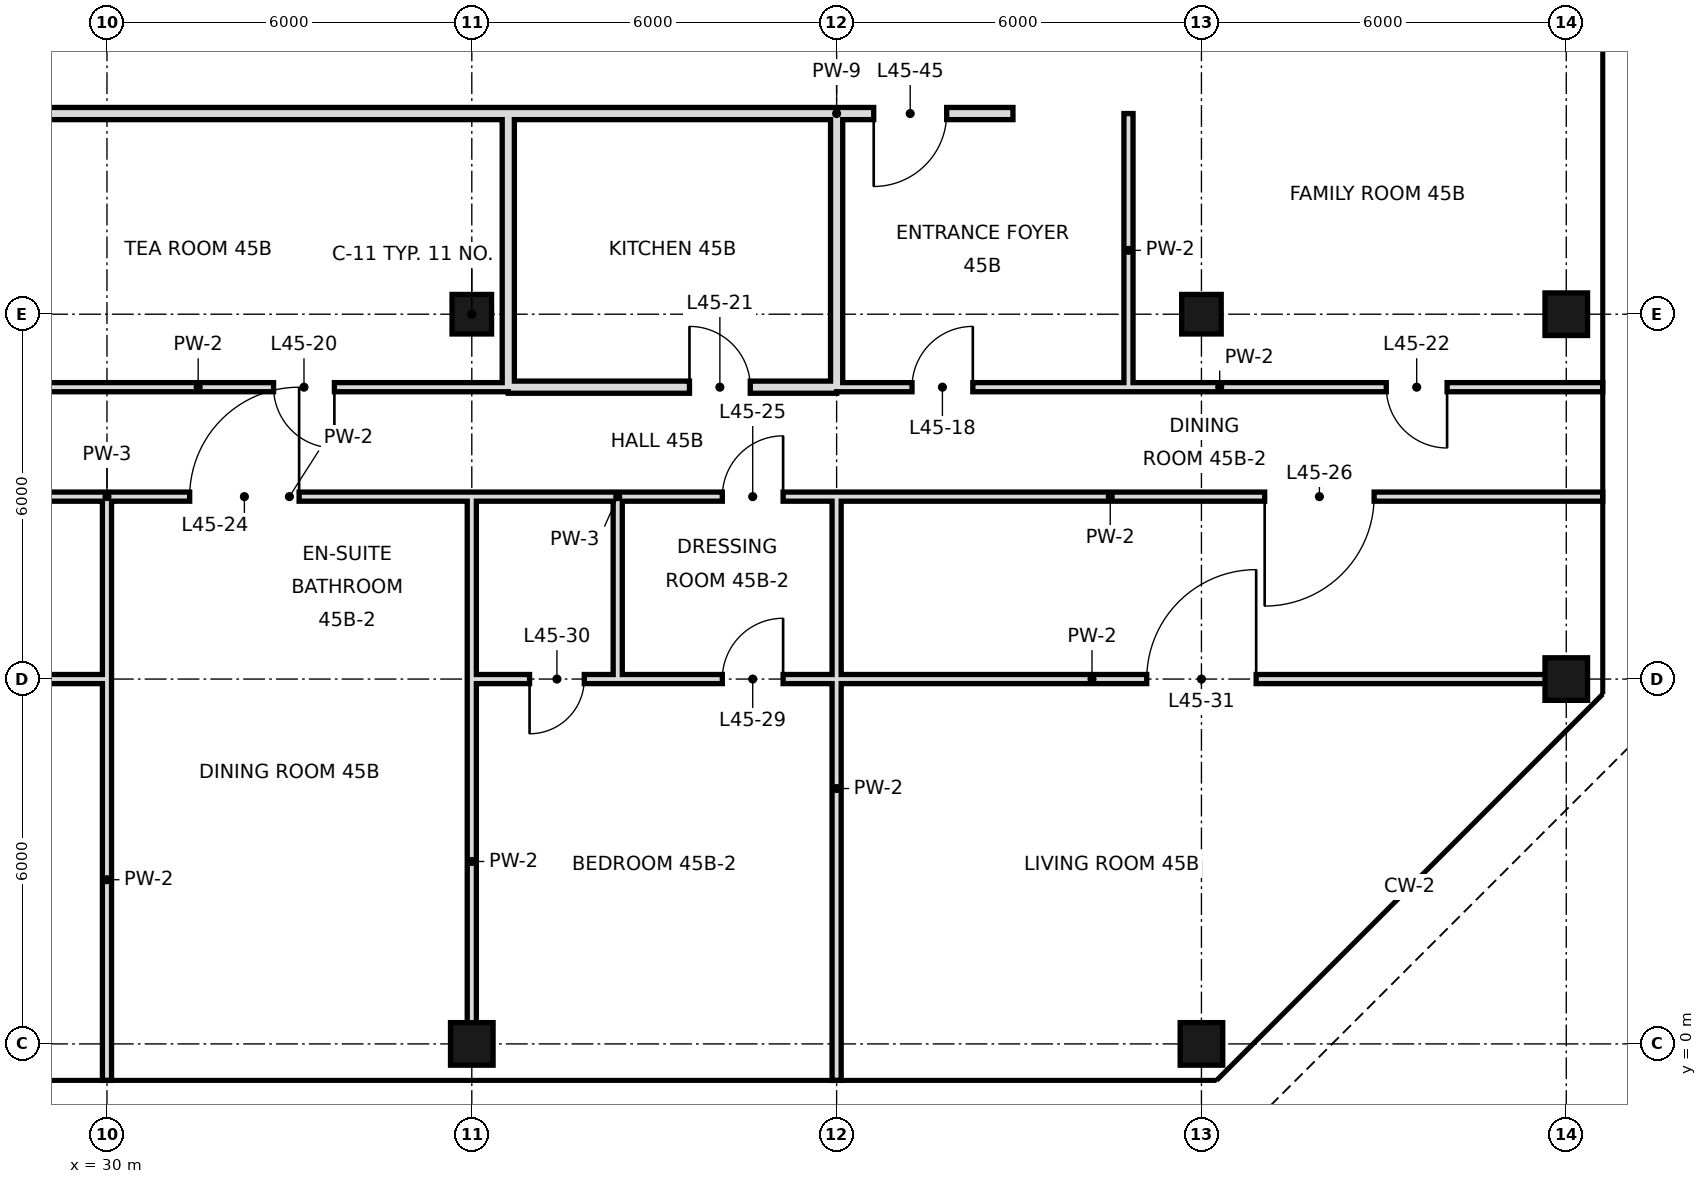
"""IFC4 building model, lengths in metres.
Left out: names, types, materials, properties, quantities, classifications, styles, units other than length and angle.
Written with IfcOpenShell. Run it as: python <this file> out.ifc"""

import sys

from ifc_helpers import new_model, si_unit, direction, frame, frame_2d, origin, origin_2d, place, context, subcontext, project, spatial, rectangle, hollow_rectangle, extrude, element, fill, save


model = new_model("IFC4")
c1 = context("Model", 3, precision=1e-05, world=origin(), true_north=direction((0.0, 1.0)))
c2 = subcontext(c1, "Body", "Model", "MODEL_VIEW")
j1 = project(units=[si_unit("LENGTHUNIT", "METRE"), si_unit("PLANEANGLEUNIT", "RADIAN")], contexts=[c1])
p1 = place(None, origin())
s1 = spatial("IfcSite", under=j1, at=p1, CompositionType="ELEMENT")
p2 = place(p1, origin())
s2 = spatial("IfcBuilding", under=s1, at=p2, CompositionType="ELEMENT")
p3 = place(p2, frame((0.0, 0.0, 195.6)))
s3 = spatial("IfcBuildingStorey", under=s2, at=p3, CompositionType="ELEMENT", Elevation=195.6)
p4 = place(p3, frame((36.0, 0.0, 0.0), z_axis=(0.0, 0.0, 1.0), x_axis=(1.0, 0.0, 0.0)))
e1 = element("IfcColumn", 1, at=p4, inside=s3, PredefinedType="COLUMN", context=c2, shape_type="SweptSolid", body=[
    extrude(hollow_rectangle(XDim=0.7, YDim=0.7, WallThickness=0.036, at=origin_2d()), origin(), (0.0, 0.0, 1.0), 3.6),
])
p5 = place(p3, frame((36.0, 12.0, 0.0), z_axis=(0.0, 0.0, 1.0), x_axis=(1.0, 0.0, 0.0)))
e2 = element("IfcColumn", 2, at=p5, inside=s3, PredefinedType="COLUMN", context=c2, shape_type="SweptSolid", body=[
    extrude(hollow_rectangle(XDim=0.65, YDim=0.65, WallThickness=0.032, at=origin_2d()), origin(), (0.0, 0.0, 1.0), 3.6),
])
p6 = place(p3, frame((48.0, 0.0, 0.0), z_axis=(0.0, 0.0, 1.0), x_axis=(1.0, 0.0, 0.0)))
e3 = element("IfcColumn", 3, at=p6, inside=s3, PredefinedType="COLUMN", context=c2, shape_type="SweptSolid", body=[
    extrude(hollow_rectangle(XDim=0.7, YDim=0.7, WallThickness=0.036, at=origin_2d()), origin(), (0.0, 0.0, 1.0), 3.6),
])
p7 = place(p3, frame((48.0, 12.0, 0.0), z_axis=(0.0, 0.0, 1.0), x_axis=(1.0, 0.0, 0.0)))
e4 = element("IfcColumn", 4, at=p7, inside=s3, PredefinedType="COLUMN", context=c2, shape_type="SweptSolid", body=[
    extrude(hollow_rectangle(XDim=0.65, YDim=0.65, WallThickness=0.032, at=origin_2d()), origin(), (0.0, 0.0, 1.0), 3.6),
])
for number, where, z_axis, x_axis in (
    (5, (54.0, 6.0, 0.0), (0.0, 0.0, 1.0), (1.0, 0.0, 0.0)),
    (6, (54.0, 12.0, 0.0), (0.0, 0.0, 1.0), (1.0, 0.0, 0.0)),
):
    element("IfcColumn", number, at=place(p3, frame(where, z_axis=z_axis, x_axis=x_axis)), inside=s3, PredefinedType="COLUMN", context=c2, shape_type="SweptSolid", body=[
        extrude(hollow_rectangle(XDim=0.7, YDim=0.7, WallThickness=0.036, at=origin_2d()), origin(), (0.0, 0.0, 1.0), 3.6),
    ])
p8 = place(p3, frame((30.0, -0.6, 0.0), z_axis=(0.0, 0.0, 1.0), x_axis=(0.0, 1.0, 0.0)))
e7 = element("IfcWall", 7, at=p8, inside=s3, PredefinedType="PARTITIONING", context=c2, shape_type="SweptSolid", body=[
    extrude(rectangle(XDim=6.6, YDim=0.15, at=frame_2d((3.3, 0.0))), origin(), (0.0, 0.0, 1.0), 2.72),
])
p9 = place(p3, frame((30.0, 6.0, 0.0), z_axis=(0.0, 0.0, 1.0), x_axis=(0.0, 1.0, 0.0)))
e8 = element("IfcWall", 8, at=p9, inside=s3, PredefinedType="PARTITIONING", context=c2, shape_type="SweptSolid", body=[
    extrude(rectangle(XDim=3.0, YDim=0.15, at=frame_2d((1.5, 0.0))), origin(), (0.0, 0.0, 1.0), 2.72),
])
p10 = place(p3, frame((36.0, 0.0, 0.0), z_axis=(0.0, 0.0, 1.0), x_axis=(0.0, 1.0, 0.0)))
e9 = element("IfcWall", 9, at=p10, inside=s3, PredefinedType="PARTITIONING", context=c2, shape_type="SweptSolid", body=[
    extrude(rectangle(XDim=6.0, YDim=0.15, at=frame_2d((3.0, 0.0))), origin(), (0.0, 0.0, 1.0), 2.72),
])
p11 = place(p3, frame((36.0, 6.0, 0.0), z_axis=(0.0, 0.0, 1.0), x_axis=(0.0, 1.0, 0.0)))
e10 = element("IfcWall", 10, at=p11, inside=s3, PredefinedType="PARTITIONING", context=c2, shape_type="SweptSolid", body=[
    extrude(rectangle(XDim=3.0, YDim=0.15, at=frame_2d((1.5, 0.0))), origin(), (0.0, 0.0, 1.0), 2.72),
])
p12 = place(p3, frame((36.6, 10.8, 0.0), z_axis=(0.0, 0.0, 1.0), x_axis=(0.0, 1.0, 0.0)))
e11 = element("IfcWall", 11, at=p12, inside=s3, PredefinedType="SOLIDWALL", context=c2, shape_type="SweptSolid", body=[
    extrude(rectangle(XDim=4.5, YDim=0.2, at=frame_2d((2.25, 0.0))), origin(), (0.0, 0.0, 1.0), 2.72),
])
p13 = place(p3, frame((38.4, 6.0, 0.0), z_axis=(0.0, 0.0, 1.0), x_axis=(0.0, 1.0, 0.0)))
e12 = element("IfcWall", 12, at=p13, inside=s3, PredefinedType="PARTITIONING", context=c2, shape_type="SweptSolid", body=[
    extrude(rectangle(XDim=3.0, YDim=0.15, at=frame_2d((1.5, 0.0))), origin(), (0.0, 0.0, 1.0), 3.42),
])
p14 = place(p3, frame((42.0, 10.8, 0.0), z_axis=(0.0, 0.0, 1.0), x_axis=(0.0, 1.0, 0.0)))
e13 = element("IfcWall", 13, at=p14, inside=s3, PredefinedType="SOLIDWALL", context=c2, shape_type="SweptSolid", body=[
    extrude(rectangle(XDim=4.5, YDim=0.2, at=frame_2d((2.25, 0.0))), origin(), (0.0, 0.0, 1.0), 2.72),
])
p15 = place(p3, frame((42.0, -0.6, 0.0), z_axis=(0.0, 0.0, 1.0), x_axis=(0.0, 1.0, 0.0)))
e14 = element("IfcWall", 14, at=p15, inside=s3, PredefinedType="PARTITIONING", context=c2, shape_type="SweptSolid", body=[
    extrude(rectangle(XDim=9.6, YDim=0.15, at=frame_2d((4.8, 0.0))), origin(), (0.0, 0.0, 1.0), 2.72),
])
p16 = place(p3, frame((46.8, 10.8, 0.0), z_axis=(0.0, 0.0, 1.0), x_axis=(0.0, 1.0, 0.0)))
e15 = element("IfcWall", 15, at=p16, inside=s3, PredefinedType="PARTITIONING", context=c2, shape_type="SweptSolid", body=[
    extrude(rectangle(XDim=4.5, YDim=0.15, at=frame_2d((2.25, 0.0))), origin(), (0.0, 0.0, 1.0), 3.42),
])
p17 = place(p3, frame((36.6, 10.8, 0.0), z_axis=(0.0, 0.0, 1.0), x_axis=(1.0, 0.0, 0.0)))
e16 = element("IfcWall", 16, at=p17, inside=s3, PredefinedType="SOLIDWALL", context=c2, shape_type="SweptSolid", body=[
    extrude(rectangle(XDim=5.4, YDim=0.2, at=frame_2d((2.7, 0.0))), origin(), (0.0, 0.0, 1.0), 2.72),
])
p18 = place(p17, frame((2.98, 0.0, 0.0)))
e17 = element("IfcOpeningElement", 17, at=p18, cuts=e16, PredefinedType="OPENING", context=c2, shape_type="SweptSolid", body=[
    extrude(rectangle(XDim=1.0, YDim=2.4, at=frame_2d((0.5, 1.2))), frame((0.0, 0.11, 0.0), z_axis=(0.0, -1.0, 0.0), x_axis=(1.0, 0.0, 0.0)), (0.0, 0.0, 1.0), 0.22),
])
p19 = place(p3, frame((26.4, 10.8, 0.0), z_axis=(0.0, 0.0, 1.0), x_axis=(1.0, 0.0, 0.0)))
e18 = element("IfcWall", 18, at=p19, inside=s3, PredefinedType="PARTITIONING", context=c2, shape_type="SweptSolid", body=[
    extrude(rectangle(XDim=10.2, YDim=0.15, at=frame_2d((5.1, 0.0))), origin(), (0.0, 0.0, 1.0), 3.42),
])
p20 = place(p19, frame((6.34, 0.0, 0.0)))
e19 = element("IfcOpeningElement", 19, at=p20, cuts=e18, PredefinedType="OPENING", context=c2, shape_type="SweptSolid", body=[
    extrude(rectangle(XDim=1.0, YDim=2.4, at=frame_2d((0.5, 1.2))), frame((0.0, 0.085, 0.0), z_axis=(0.0, -1.0, 0.0), x_axis=(1.0, 0.0, 0.0)), (0.0, 0.0, 1.0), 0.17),
])
p21 = place(p3, frame((42.0, 10.8, 0.0), z_axis=(0.0, 0.0, 1.0), x_axis=(1.0, 0.0, 0.0)))
e20 = element("IfcWall", 20, at=p21, inside=s3, PredefinedType="PARTITIONING", context=c2, shape_type="SweptSolid", body=[
    extrude(rectangle(XDim=12.6, YDim=0.15, at=frame_2d((6.3, 0.0))), origin(), (0.0, 0.0, 1.0), 3.42),
])
p22 = place(p21, frame((1.24, 0.0, 0.0)))
e21 = element("IfcOpeningElement", 21, at=p22, cuts=e20, PredefinedType="OPENING", context=c2, shape_type="SweptSolid", body=[
    extrude(rectangle(XDim=1.0, YDim=2.4, at=frame_2d((0.5, 1.2))), frame((0.0, 0.085, 0.0), z_axis=(0.0, -1.0, 0.0), x_axis=(1.0, 0.0, 0.0)), (0.0, 0.0, 1.0), 0.17),
])
p23 = place(p21, frame((9.04, 0.0, 0.0)))
e22 = element("IfcOpeningElement", 22, at=p23, cuts=e20, PredefinedType="OPENING", context=c2, shape_type="SweptSolid", body=[
    extrude(rectangle(XDim=1.0, YDim=2.4, at=frame_2d((0.5, 1.2))), frame((0.0, 0.085, 0.0), z_axis=(0.0, -1.0, 0.0), x_axis=(1.0, 0.0, 0.0)), (0.0, 0.0, 1.0), 0.17),
])
p24 = place(p3, frame((7.8, 15.3, 0.0), z_axis=(0.0, 0.0, 1.0), x_axis=(1.0, 0.0, 0.0)))
e23 = element("IfcWall", 23, at=p24, inside=s3, PredefinedType="SOLIDWALL", context=c2, shape_type="SweptSolid", body=[
    extrude(rectangle(XDim=28.8, YDim=0.2, at=frame_2d((14.4, 0.0))), origin(), (0.0, 0.0, 1.0), 2.72),
])
p25 = place(p24, frame((1.54, 0.0, 0.0)))
e24 = element("IfcOpeningElement", 24, at=p25, cuts=e23, PredefinedType="OPENING", context=c2, shape_type="SweptSolid", body=[
    extrude(rectangle(XDim=1.2, YDim=2.4, at=frame_2d((0.6, 1.2))), frame((0.0, 0.11, 0.0), z_axis=(0.0, -1.0, 0.0), x_axis=(1.0, 0.0, 0.0)), (0.0, 0.0, 1.0), 0.22),
])
p26 = place(p3, frame((42.0, 15.3, 0.0), z_axis=(0.0, 0.0, 1.0), x_axis=(1.0, 0.0, 0.0)))
e25 = element("IfcWall", 25, at=p26, inside=s3, PredefinedType="SOLIDWALL", context=c2, shape_type="SweptSolid", body=[
    extrude(rectangle(XDim=2.9, YDim=0.2, at=frame_2d((1.45, 0.0))), origin(), (0.0, 0.0, 1.0), 2.72),
])
p27 = place(p26, frame((0.61, 0.0, 0.0)))
e26 = element("IfcOpeningElement", 26, at=p27, cuts=e25, PredefinedType="OPENING", context=c2, shape_type="SweptSolid", body=[
    extrude(rectangle(XDim=1.2, YDim=2.4, at=frame_2d((0.6, 1.2))), frame((0.0, 0.11, 0.0), z_axis=(0.0, -1.0, 0.0), x_axis=(1.0, 0.0, 0.0)), (0.0, 0.0, 1.0), 0.22),
])
p28 = place(p3, frame((36.6, 15.3, 0.0), z_axis=(0.0, 0.0, 1.0), x_axis=(1.0, 0.0, 0.0)))
e27 = element("IfcWall", 27, at=p28, inside=s3, PredefinedType="SOLIDWALL", context=c2, shape_type="SweptSolid", body=[
    extrude(rectangle(XDim=5.4, YDim=0.2, at=frame_2d((2.7, 0.0))), origin(), (0.0, 0.0, 1.0), 2.72),
])
p29 = place(p3, frame((38.4, 6.0, 0.0), z_axis=(0.0, 0.0, 1.0), x_axis=(1.0, 0.0, 0.0)))
e28 = element("IfcWall", 28, at=p29, inside=s3, PredefinedType="PARTITIONING", context=c2, shape_type="SweptSolid", body=[
    extrude(rectangle(XDim=15.6, YDim=0.15, at=frame_2d((7.8, 0.0))), origin(), (0.0, 0.0, 1.0), 2.97),
])
p30 = place(p29, frame((1.72, 0.0, 0.0)))
e29 = element("IfcOpeningElement", 29, at=p30, cuts=e28, PredefinedType="OPENING", context=c2, shape_type="SweptSolid", body=[
    extrude(rectangle(XDim=1.0, YDim=2.4, at=frame_2d((0.5, 1.2))), frame((0.0, 0.085, 0.0), z_axis=(0.0, -1.0, 0.0), x_axis=(1.0, 0.0, 0.0)), (0.0, 0.0, 1.0), 0.17),
])
p31 = place(p29, frame((8.7, 0.0, 0.0)))
e30 = element("IfcOpeningElement", 30, at=p31, cuts=e28, PredefinedType="OPENING", context=c2, shape_type="SweptSolid", body=[
    extrude(rectangle(XDim=1.8, YDim=2.4, at=frame_2d((0.9, 1.2))), frame((0.0, 0.085, 0.0), z_axis=(0.0, -1.0, 0.0), x_axis=(1.0, 0.0, 0.0)), (0.0, 0.0, 1.0), 0.17),
])
p32 = place(p3, frame((26.4, 6.0, 0.0), z_axis=(0.0, 0.0, 1.0), x_axis=(1.0, 0.0, 0.0)))
e31 = element("IfcWall", 31, at=p32, inside=s3, PredefinedType="PARTITIONING", context=c2, shape_type="SweptSolid", body=[
    extrude(rectangle(XDim=3.6, YDim=0.15, at=frame_2d((1.8, 0.0))), origin(), (0.0, 0.0, 1.0), 2.97),
])
p33 = place(p32, frame((0.91, 0.0, 0.0)))
e32 = element("IfcOpeningElement", 32, at=p33, cuts=e31, PredefinedType="OPENING", context=c2, shape_type="SweptSolid", body=[
    extrude(rectangle(XDim=0.9, YDim=2.4, at=frame_2d((0.45, 1.2))), frame((0.0, 0.085, 0.0), z_axis=(0.0, -1.0, 0.0), x_axis=(1.0, 0.0, 0.0)), (0.0, 0.0, 1.0), 0.17),
])
p34 = place(p3, frame((36.0, 6.0, 0.0), z_axis=(0.0, 0.0, 1.0), x_axis=(1.0, 0.0, 0.0)))
e33 = element("IfcWall", 33, at=p34, inside=s3, PredefinedType="PARTITIONING", context=c2, shape_type="SweptSolid", body=[
    extrude(rectangle(XDim=2.4, YDim=0.15, at=frame_2d((1.2, 0.0))), origin(), (0.0, 0.0, 1.0), 2.97),
])
p35 = place(p34, frame((0.95, 0.0, 0.0)))
e34 = element("IfcOpeningElement", 34, at=p35, cuts=e33, PredefinedType="OPENING", context=c2, shape_type="SweptSolid", body=[
    extrude(rectangle(XDim=0.9, YDim=2.4, at=frame_2d((0.45, 1.2))), frame((0.0, 0.085, 0.0), z_axis=(0.0, -1.0, 0.0), x_axis=(1.0, 0.0, 0.0)), (0.0, 0.0, 1.0), 0.17),
])
p36 = place(p3, frame((30.0, 9.0, 0.0), z_axis=(0.0, 0.0, 1.0), x_axis=(1.0, 0.0, 0.0)))
e35 = element("IfcWall", 35, at=p36, inside=s3, PredefinedType="PARTITIONING", context=c2, shape_type="SweptSolid", body=[
    extrude(rectangle(XDim=6.0, YDim=0.15, at=frame_2d((3.0, 0.0))), origin(), (0.0, 0.0, 1.0), 3.42),
])
p37 = place(p36, frame((1.36, 0.0, 0.0)))
e36 = element("IfcOpeningElement", 36, at=p37, cuts=e35, PredefinedType="OPENING", context=c2, shape_type="SweptSolid", body=[
    extrude(rectangle(XDim=1.8, YDim=2.4, at=frame_2d((0.9, 1.2))), frame((0.0, 0.085, 0.0), z_axis=(0.0, -1.0, 0.0), x_axis=(1.0, 0.0, 0.0)), (0.0, 0.0, 1.0), 0.17),
])
p38 = place(p3, frame((38.4, 9.0, 0.0), z_axis=(0.0, 0.0, 1.0), x_axis=(1.0, 0.0, 0.0)))
e37 = element("IfcWall", 37, at=p38, inside=s3, PredefinedType="PARTITIONING", context=c2, shape_type="SweptSolid", body=[
    extrude(rectangle(XDim=16.2, YDim=0.15, at=frame_2d((8.1, 0.0))), origin(), (0.0, 0.0, 1.0), 3.42),
])
p39 = place(p38, frame((1.72, 0.0, 0.0)))
e38 = element("IfcOpeningElement", 38, at=p39, cuts=e37, PredefinedType="OPENING", context=c2, shape_type="SweptSolid", body=[
    extrude(rectangle(XDim=1.0, YDim=2.4, at=frame_2d((0.5, 1.2))), frame((0.0, 0.085, 0.0), z_axis=(0.0, -1.0, 0.0), x_axis=(1.0, 0.0, 0.0)), (0.0, 0.0, 1.0), 0.17),
])
p40 = place(p38, frame((10.64, 0.0, 0.0)))
e39 = element("IfcOpeningElement", 39, at=p40, cuts=e37, PredefinedType="OPENING", context=c2, shape_type="SweptSolid", body=[
    extrude(rectangle(XDim=1.8, YDim=2.4, at=frame_2d((0.9, 1.2))), frame((0.0, 0.085, 0.0), z_axis=(0.0, -1.0, 0.0), x_axis=(1.0, 0.0, 0.0)), (0.0, 0.0, 1.0), 0.17),
])
p41 = place(p3, frame((26.4, 9.0, 0.0), z_axis=(0.0, 0.0, 1.0), x_axis=(1.0, 0.0, 0.0)))
e40 = element("IfcWall", 40, at=p41, inside=s3, PredefinedType="PARTITIONING", context=c2, shape_type="SweptSolid", body=[
    extrude(rectangle(XDim=3.6, YDim=0.15, at=frame_2d((1.8, 0.0))), origin(), (0.0, 0.0, 1.0), 3.42),
])
p42 = place(p3, frame((36.0, 9.0, 0.0), z_axis=(0.0, 0.0, 1.0), x_axis=(1.0, 0.0, 0.0)))
e41 = element("IfcWall", 41, at=p42, inside=s3, PredefinedType="PARTITIONING", context=c2, shape_type="SweptSolid", body=[
    extrude(rectangle(XDim=2.4, YDim=0.15, at=frame_2d((1.2, 0.0))), origin(), (0.0, 0.0, 1.0), 3.42),
])
p43 = place(p22, frame((1.0, 0.0, 0.0), z_axis=(0.0, 0.0, 1.0), x_axis=(-1.0, 0.0, 0.0)))
e42 = element("IfcDoor", 42, at=p43, inside=s3, OperationType="SINGLE_SWING_LEFT", PredefinedType="DOOR", context=c2, shape_type="SweptSolid", body=[
    extrude(rectangle(XDim=1.0, YDim=2.4, at=frame_2d((0.5, 1.2))), frame((0.0, 0.025, 0.0), z_axis=(0.0, -1.0, 0.0), x_axis=(1.0, 0.0, 0.0)), (0.0, 0.0, 1.0), 0.05),
])
fill(e21, e42)
p44 = place(p20, origin())
e43 = element("IfcDoor", 43, at=p44, inside=s3, OperationType="SINGLE_SWING_RIGHT", PredefinedType="DOOR", context=c2, shape_type="SweptSolid", body=[
    extrude(rectangle(XDim=1.0, YDim=2.4, at=frame_2d((0.5, 1.2))), frame((0.0, 0.025, 0.0), z_axis=(0.0, -1.0, 0.0), x_axis=(1.0, 0.0, 0.0)), (0.0, 0.0, 1.0), 0.05),
])
fill(e19, e43)
p45 = place(p18, origin())
e44 = element("IfcDoor", 44, at=p45, inside=s3, OperationType="SINGLE_SWING_LEFT", PredefinedType="DOOR", context=c2, shape_type="SweptSolid", body=[
    extrude(rectangle(XDim=1.0, YDim=2.4, at=frame_2d((0.5, 1.2))), frame((0.0, 0.025, 0.0), z_axis=(0.0, -1.0, 0.0), x_axis=(1.0, 0.0, 0.0)), (0.0, 0.0, 1.0), 0.05),
])
fill(e17, e44)
p46 = place(p23, origin())
e45 = element("IfcDoor", 45, at=p46, inside=s3, OperationType="SINGLE_SWING_RIGHT", PredefinedType="DOOR", context=c2, shape_type="SweptSolid", body=[
    extrude(rectangle(XDim=1.0, YDim=2.4, at=frame_2d((0.5, 1.2))), frame((0.0, 0.025, 0.0), z_axis=(0.0, -1.0, 0.0), x_axis=(1.0, 0.0, 0.0)), (0.0, 0.0, 1.0), 0.05),
])
fill(e22, e45)
p47 = place(p37, frame((1.8, 0.0, 0.0), z_axis=(0.0, 0.0, 1.0), x_axis=(-1.0, 0.0, 0.0)))
e46 = element("IfcDoor", 46, at=p47, inside=s3, OperationType="SINGLE_SWING_LEFT", PredefinedType="DOOR", context=c2, shape_type="SweptSolid", body=[
    extrude(rectangle(XDim=1.8, YDim=2.4, at=frame_2d((0.9, 1.2))), frame((0.0, 0.025, 0.0), z_axis=(0.0, -1.0, 0.0), x_axis=(1.0, 0.0, 0.0)), (0.0, 0.0, 1.0), 0.05),
])
fill(e36, e46)
p48 = place(p39, frame((1.0, 0.0, 0.0), z_axis=(0.0, 0.0, 1.0), x_axis=(-1.0, 0.0, 0.0)))
e47 = element("IfcDoor", 47, at=p48, inside=s3, OperationType="SINGLE_SWING_LEFT", PredefinedType="DOOR", context=c2, shape_type="SweptSolid", body=[
    extrude(rectangle(XDim=1.0, YDim=2.4, at=frame_2d((0.5, 1.2))), frame((0.0, 0.025, 0.0), z_axis=(0.0, -1.0, 0.0), x_axis=(1.0, 0.0, 0.0)), (0.0, 0.0, 1.0), 0.05),
])
fill(e38, e47)
p49 = place(p40, frame((1.8, 0.0, 0.0), z_axis=(0.0, 0.0, 1.0), x_axis=(-1.0, 0.0, 0.0)))
e48 = element("IfcDoor", 48, at=p49, inside=s3, OperationType="SINGLE_SWING_RIGHT", PredefinedType="DOOR", context=c2, shape_type="SweptSolid", body=[
    extrude(rectangle(XDim=1.8, YDim=2.4, at=frame_2d((0.9, 1.2))), frame((0.0, 0.025, 0.0), z_axis=(0.0, -1.0, 0.0), x_axis=(1.0, 0.0, 0.0)), (0.0, 0.0, 1.0), 0.05),
])
fill(e39, e48)
p50 = place(p30, frame((1.0, 0.0, 0.0), z_axis=(0.0, 0.0, 1.0), x_axis=(-1.0, 0.0, 0.0)))
e49 = element("IfcDoor", 49, at=p50, inside=s3, OperationType="SINGLE_SWING_LEFT", PredefinedType="DOOR", context=c2, shape_type="SweptSolid", body=[
    extrude(rectangle(XDim=1.0, YDim=2.4, at=frame_2d((0.5, 1.2))), frame((0.0, 0.025, 0.0), z_axis=(0.0, -1.0, 0.0), x_axis=(1.0, 0.0, 0.0)), (0.0, 0.0, 1.0), 0.05),
])
fill(e29, e49)
p51 = place(p35, frame((0.9, 0.0, 0.0), z_axis=(0.0, 0.0, 1.0), x_axis=(-1.0, 0.0, 0.0)))
e50 = element("IfcDoor", 50, at=p51, inside=s3, OperationType="SINGLE_SWING_RIGHT", PredefinedType="DOOR", context=c2, shape_type="SweptSolid", body=[
    extrude(rectangle(XDim=0.9, YDim=2.4, at=frame_2d((0.45, 1.2))), frame((0.0, 0.025, 0.0), z_axis=(0.0, -1.0, 0.0), x_axis=(1.0, 0.0, 0.0)), (0.0, 0.0, 1.0), 0.05),
])
fill(e34, e50)
p52 = place(p31, frame((1.8, 0.0, 0.0), z_axis=(0.0, 0.0, 1.0), x_axis=(-1.0, 0.0, 0.0)))
e51 = element("IfcDoor", 51, at=p52, inside=s3, OperationType="SINGLE_SWING_LEFT", PredefinedType="DOOR", context=c2, shape_type="SweptSolid", body=[
    extrude(rectangle(XDim=1.8, YDim=2.4, at=frame_2d((0.9, 1.2))), frame((0.0, 0.025, 0.0), z_axis=(0.0, -1.0, 0.0), x_axis=(1.0, 0.0, 0.0)), (0.0, 0.0, 1.0), 0.05),
])
fill(e30, e51)
p53 = place(p27, frame((1.2, 0.0, 0.0), z_axis=(0.0, 0.0, 1.0), x_axis=(-1.0, 0.0, 0.0)))
e52 = element("IfcDoor", 52, at=p53, inside=s3, OperationType="SINGLE_SWING_RIGHT", PredefinedType="DOOR", context=c2, shape_type="SweptSolid", body=[
    extrude(rectangle(XDim=1.2, YDim=2.4, at=frame_2d((0.6, 1.2))), frame((0.0, 0.025, 0.0), z_axis=(0.0, -1.0, 0.0), x_axis=(1.0, 0.0, 0.0)), (0.0, 0.0, 1.0), 0.05),
])
fill(e26, e52)
save(model, sys.argv[1])
